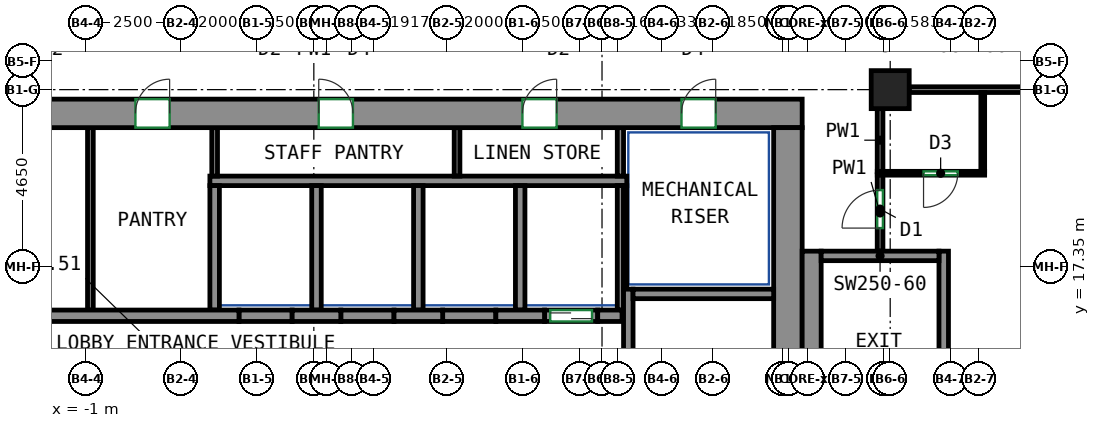
"""IFC4 building model, lengths in metres.
Left out: names, types, materials, properties, quantities, classifications, styles, units other than length and angle.
Written with IfcOpenShell. Run it as: python <this file> out.ifc"""

import sys

from ifc_helpers import new_model, si_unit, direction, frame, frame_2d, origin, origin_2d, place, context, subcontext, project, spatial, rectangle, extrude, source, transform, mapped, element, fill, save


model = new_model("IFC4")
c1 = context("Model", 3, precision=1e-05, world=origin(), true_north=direction((0.0, 1.0)))
c2 = subcontext(c1, "Body", "Model", "MODEL_VIEW")
j1 = project(units=[si_unit("LENGTHUNIT", "METRE"), si_unit("PLANEANGLEUNIT", "RADIAN")], contexts=[c1])
p1 = place(None, origin())
s1 = spatial("IfcSite", under=j1, at=p1, CompositionType="ELEMENT")
p2 = place(p1, origin())
s2 = spatial("IfcBuilding", under=s1, at=p2, CompositionType="ELEMENT")
p3 = place(p2, frame((0.0, 0.0, 206.7)))
s3 = spatial("IfcBuildingStorey", under=s2, at=p3, CompositionType="ELEMENT", Elevation=206.7)
m1 = source(origin(), c2, "Body", "SweptSolid", [
    extrude(rectangle(XDim=1.0, YDim=1.0, at=origin_2d()), origin(), (0.0, 0.0, 1.0), 3.12),
])
p4 = place(p3, frame((20.167, 22.0, 0.0), z_axis=(0.0, 0.0, 1.0), x_axis=(1.0, 0.0, 0.0)))
e1 = element("IfcColumn", 1, at=p4, inside=s3, PredefinedType="COLUMN", context=c2, shape_type="MappedRepresentation", body=[
    mapped(m1, transform((0.0, 0.0, 0.0))),
])
m2 = source(origin(), c2, "Body", "SweptSolid", [
    extrude(rectangle(XDim=33.6, YDim=0.75, at=frame_2d((16.8, 0.0))), origin(), (0.0, 0.0, 1.0), 3.12),
])
p5 = place(p3, frame((-15.75, 21.375, 0.0), z_axis=(0.0, 0.0, 1.0), x_axis=(1.0, 0.0, 0.0)))
e2 = element("IfcWall", 2, at=p5, inside=s3, PredefinedType="SHEAR", context=c2, shape_type="MappedRepresentation", body=[
    mapped(m2, transform((0.0, 0.0, 0.0))),
])
p6 = place(p5, frame((5.858, 0.0, 0.0)))
e3 = element("IfcOpeningElement", 3, at=p6, cuts=e2, PredefinedType="OPENING", context=c2, shape_type="SweptSolid", body=[
    extrude(rectangle(XDim=0.9, YDim=2.1, at=frame_2d((0.45, 1.05))), frame((0.0, 0.385, 0.0), z_axis=(0.0, -1.0, 0.0), x_axis=(1.0, 0.0, 0.0)), (0.0, 0.0, 1.0), 0.77),
])
p7 = place(p5, frame((10.923, 0.0, 0.0)))
e4 = element("IfcOpeningElement", 4, at=p7, cuts=e2, PredefinedType="OPENING", context=c2, shape_type="SweptSolid", body=[
    extrude(rectangle(XDim=0.9, YDim=2.1, at=frame_2d((0.45, 1.05))), frame((0.0, 0.385, 0.0), z_axis=(0.0, -1.0, 0.0), x_axis=(1.0, 0.0, 0.0)), (0.0, 0.0, 1.0), 0.77),
])
p8 = place(p5, frame((16.055, 0.0, 0.0)))
e5 = element("IfcOpeningElement", 5, at=p8, cuts=e2, PredefinedType="OPENING", context=c2, shape_type="SweptSolid", body=[
    extrude(rectangle(XDim=0.9, YDim=2.1, at=frame_2d((0.45, 1.05))), frame((0.0, 0.385, 0.0), z_axis=(0.0, -1.0, 0.0), x_axis=(1.0, 0.0, 0.0)), (0.0, 0.0, 1.0), 0.77),
])
p9 = place(p5, frame((20.879, 0.0, 0.0)))
e6 = element("IfcOpeningElement", 6, at=p9, cuts=e2, PredefinedType="OPENING", context=c2, shape_type="SweptSolid", body=[
    extrude(rectangle(XDim=0.9, YDim=2.1, at=frame_2d((0.45, 1.05))), frame((0.0, 0.385, 0.0), z_axis=(0.0, -1.0, 0.0), x_axis=(1.0, 0.0, 0.0)), (0.0, 0.0, 1.0), 0.77),
])
p10 = place(p5, frame((26.239, 0.0, 0.0)))
e7 = element("IfcOpeningElement", 7, at=p10, cuts=e2, PredefinedType="OPENING", context=c2, shape_type="SweptSolid", body=[
    extrude(rectangle(XDim=0.9, YDim=2.1, at=frame_2d((0.45, 1.05))), frame((0.0, 0.385, 0.0), z_axis=(0.0, -1.0, 0.0), x_axis=(1.0, 0.0, 0.0)), (0.0, 0.0, 1.0), 0.77),
])
p11 = place(p5, frame((2.275, 0.0, 0.0)))
e8 = element("IfcOpeningElement", 8, at=p11, cuts=e2, PredefinedType="OPENING", context=c2, shape_type="SweptSolid", body=[
    extrude(rectangle(XDim=0.9, YDim=2.1, at=frame_2d((0.45, 1.05))), frame((0.0, 0.385, 0.0), z_axis=(0.0, -1.0, 0.0), x_axis=(1.0, 0.0, 0.0)), (0.0, 0.0, 1.0), 0.77),
])
p12 = place(p5, frame((30.425, 0.0, 0.0)))
e9 = element("IfcOpeningElement", 9, at=p12, cuts=e2, PredefinedType="OPENING", context=c2, shape_type="SweptSolid", body=[
    extrude(rectangle(XDim=0.9, YDim=2.1, at=frame_2d((0.45, 1.05))), frame((0.0, 0.385, 0.0), z_axis=(0.0, -1.0, 0.0), x_axis=(1.0, 0.0, 0.0)), (0.0, 0.0, 1.0), 0.77),
])
m3 = source(origin(), c2, "Body", "SweptSolid", [
    extrude(rectangle(XDim=12.0, YDim=0.75, at=frame_2d((6.0, 0.0))), origin(), (0.0, 0.0, 1.0), 3.12),
])
p13 = place(p3, frame((17.475, 9.0, 0.0), z_axis=(0.0, 0.0, 1.0), x_axis=(0.0, 1.0, 0.0)))
e10 = element("IfcWall", 10, at=p13, inside=s3, PredefinedType="SHEAR", context=c2, shape_type="MappedRepresentation", body=[
    mapped(m3, transform((0.0, 0.0, 0.0))),
])
m4 = source(origin(), c2, "Body", "SweptSolid", [
    extrude(rectangle(XDim=7.75, YDim=0.25, at=frame_2d((3.875, 0.0))), origin(), (0.0, 0.0, 1.0), 3.12),
])
p14 = place(p3, frame((13.275, 9.0, 0.0), z_axis=(0.0, 0.0, 1.0), x_axis=(0.0, 1.0, 0.0)))
e11 = element("IfcWall", 11, at=p14, inside=s3, PredefinedType="SHEAR", context=c2, shape_type="MappedRepresentation", body=[
    mapped(m4, transform((0.0, 0.0, 0.0))),
])
m5 = source(origin(), c2, "Body", "SweptSolid", [
    extrude(rectangle(XDim=3.7, YDim=0.25, at=frame_2d((1.85, 0.0))), origin(), (0.0, 0.0, 1.0), 3.12),
])
p15 = place(p3, frame((13.4, 16.625, 0.0), z_axis=(0.0, 0.0, 1.0), x_axis=(1.0, 0.0, 0.0)))
e12 = element("IfcWall", 12, at=p15, inside=s3, PredefinedType="SHEAR", context=c2, shape_type="MappedRepresentation", body=[
    mapped(m5, transform((0.0, 0.0, 0.0))),
])
m6 = source(origin(), c2, "Body", "SweptSolid", [
    extrude(rectangle(XDim=8.0, YDim=0.5, at=frame_2d((4.0, 0.0))), origin(), (0.0, 0.0, 1.0), 3.12),
])
p16 = place(p3, frame((18.1, 9.75, 0.0), z_axis=(0.0, 0.0, 1.0), x_axis=(0.0, 1.0, 0.0)))
e13 = element("IfcWall", 13, at=p16, inside=s3, PredefinedType="SHEAR", context=c2, shape_type="MappedRepresentation", body=[
    mapped(m6, transform((0.0, 0.0, 0.0))),
])
m7 = source(origin(), c2, "Body", "SweptSolid", [
    extrude(rectangle(XDim=8.0, YDim=0.25, at=frame_2d((4.0, 0.0))), origin(), (0.0, 0.0, 1.0), 3.12),
])
p17 = place(p3, frame((21.575, 9.75, 0.0), z_axis=(0.0, 0.0, 1.0), x_axis=(0.0, 1.0, 0.0)))
e14 = element("IfcWall", 14, at=p17, inside=s3, PredefinedType="SHEAR", context=c2, shape_type="MappedRepresentation", body=[
    mapped(m7, transform((0.0, 0.0, 0.0))),
])
m8 = source(origin(), c2, "Body", "SweptSolid", [
    extrude(rectangle(XDim=3.1, YDim=0.25, at=frame_2d((1.55, 0.0))), origin(), (0.0, 0.0, 1.0), 3.12),
])
p18 = place(p3, frame((18.35, 17.625, 0.0), z_axis=(0.0, 0.0, 1.0), x_axis=(1.0, 0.0, 0.0)))
e15 = element("IfcWall", 15, at=p18, inside=s3, PredefinedType="SHEAR", context=c2, shape_type="MappedRepresentation", body=[
    mapped(m8, transform((0.0, 0.0, 0.0))),
])
m9 = source(origin(), c2, "Body", "SweptSolid", [
    extrude(rectangle(XDim=14.04, YDim=0.3, at=frame_2d((7.02, 0.0))), origin(), (0.0, 0.0, 1.0), 3.12),
])
p19 = place(p3, frame((-11.01, 16.05, 0.0), z_axis=(0.0, 0.0, 1.0), x_axis=(1.0, 0.0, 0.0)))
e16 = element("IfcWall", 16, at=p19, inside=s3, PredefinedType="SHEAR", context=c2, shape_type="MappedRepresentation", body=[
    mapped(m9, transform((0.0, 0.0, 0.0))),
])
m10 = source(origin(), c2, "Body", "SweptSolid", [
    extrude(rectangle(XDim=1.28, YDim=0.3, at=frame_2d((0.64, 0.0))), origin(), (0.0, 0.0, 1.0), 3.12),
])
p20 = place(p3, frame((4.43, 16.05, 0.0), z_axis=(0.0, 0.0, 1.0), x_axis=(1.0, 0.0, 0.0)))
e17 = element("IfcWall", 17, at=p20, inside=s3, PredefinedType="SHEAR", context=c2, shape_type="MappedRepresentation", body=[
    mapped(m10, transform((0.0, 0.0, 0.0))),
])
m11 = source(origin(), c2, "Body", "SweptSolid", [
    extrude(rectangle(XDim=1.28, YDim=0.3, at=frame_2d((0.64, 0.0))), origin(), (0.0, 0.0, 1.0), 3.12),
])
p21 = place(p3, frame((7.11, 16.05, 0.0), z_axis=(0.0, 0.0, 1.0), x_axis=(1.0, 0.0, 0.0)))
e18 = element("IfcWall", 18, at=p21, inside=s3, PredefinedType="SHEAR", context=c2, shape_type="MappedRepresentation", body=[
    mapped(m11, transform((0.0, 0.0, 0.0))),
])
p22 = place(p3, frame((9.79, 16.05, 0.0), z_axis=(0.0, 0.0, 1.0), x_axis=(1.0, 0.0, 0.0)))
e19 = element("IfcWall", 19, at=p22, inside=s3, PredefinedType="SHEAR", context=c2, shape_type="MappedRepresentation", body=[
    mapped(m10, transform((0.0, 0.0, 0.0))),
])
m12 = source(origin(), c2, "Body", "SweptSolid", [
    extrude(rectangle(XDim=0.64, YDim=0.3, at=frame_2d((0.32, 0.0))), origin(), (0.0, 0.0, 1.0), 3.12),
])
p23 = place(p3, frame((12.47, 16.05, 0.0), z_axis=(0.0, 0.0, 1.0), x_axis=(1.0, 0.0, 0.0)))
e20 = element("IfcWall", 20, at=p23, inside=s3, PredefinedType="SHEAR", context=c2, shape_type="MappedRepresentation", body=[
    mapped(m12, transform((0.0, 0.0, 0.0))),
])
m13 = source(origin(), c2, "Body", "SweptSolid", [
    extrude(rectangle(XDim=1.4, YDim=0.3, at=frame_2d((0.7, 0.0))), origin(), (0.0, 0.0, 1.0), 3.12),
])
p24 = place(p3, frame((11.07, 16.05, 0.0), z_axis=(0.0, 0.0, 1.0), x_axis=(1.0, 0.0, 0.0)))
e21 = element("IfcWall", 21, at=p24, inside=s3, PredefinedType="PARTITIONING", context=c2, shape_type="MappedRepresentation", body=[
    mapped(m13, transform((0.0, 0.0, 0.0))),
])
p25 = place(p24, frame((0.15, 0.0, 0.0)))
e22 = element("IfcOpeningElement", 22, at=p25, cuts=e21, PredefinedType="OPENING", context=c2, shape_type="SweptSolid", body=[
    extrude(rectangle(XDim=1.1, YDim=2.1, at=frame_2d((0.55, 1.05))), frame((0.0, 0.16, 0.0), z_axis=(0.0, -1.0, 0.0), x_axis=(1.0, 0.0, 0.0)), (0.0, 0.0, 1.0), 0.32),
])
p26 = place(p3, frame((3.03, 16.05, 0.0), z_axis=(0.0, 0.0, 1.0), x_axis=(1.0, 0.0, 0.0)))
e23 = element("IfcWall", 23, at=p26, inside=s3, PredefinedType="PARTITIONING", context=c2, shape_type="MappedRepresentation", body=[
    mapped(m13, transform((0.0, 0.0, 0.0))),
])
m14 = source(origin(), c2, "Body", "SweptSolid", [
    extrude(rectangle(XDim=1.4, YDim=0.3, at=frame_2d((0.7, 0.0))), origin(), (0.0, 0.0, 1.0), 3.12),
])
for number, where, z_axis, x_axis in (
    (24, (5.71, 16.05, 0.0), (0.0, 0.0, 1.0), (1.0, 0.0, 0.0)),
    (25, (8.39, 16.05, 0.0), (0.0, 0.0, 1.0), (1.0, 0.0, 0.0)),
):
    element("IfcWall", number, at=place(p3, frame(where, z_axis=z_axis, x_axis=x_axis)), inside=s3, PredefinedType="PARTITIONING", context=c2, shape_type="MappedRepresentation", body=[
        mapped(m14, transform((0.0, 0.0, 0.0))),
    ])
m15 = source(origin(), c2, "Body", "SweptSolid", [
    extrude(rectangle(XDim=10.97, YDim=0.25, at=frame_2d((5.485, 0.0))), origin(), (0.0, 0.0, 1.0), 3.12),
])
p27 = place(p3, frame((2.265, 19.6, 0.0), z_axis=(0.0, 0.0, 1.0), x_axis=(1.0, 0.0, 0.0)))
e26 = element("IfcWall", 26, at=p27, inside=s3, PredefinedType="PARTITIONING", context=c2, shape_type="MappedRepresentation", body=[
    mapped(m15, transform((0.0, 0.0, 0.0))),
])
m16 = source(origin(), c2, "Body", "SweptSolid", [
    extrude(rectangle(XDim=3.275, YDim=0.165, at=frame_2d((1.638, 0.0))), origin(), (0.0, 0.0, 1.0), 3.12),
])
p28 = place(p3, frame((13.067, 16.2, 0.0), z_axis=(0.0, 0.0, 1.0), x_axis=(0.0, 1.0, 0.0)))
e27 = element("IfcWall", 27, at=p28, inside=s3, PredefinedType="PARTITIONING", context=c2, shape_type="MappedRepresentation", body=[
    mapped(m16, transform((0.0, 0.0, 0.0))),
])
m17 = source(origin(), c2, "Body", "SweptSolid", [
    extrude(rectangle(XDim=1.275, YDim=0.165, at=frame_2d((0.637, 0.0))), origin(), (0.0, 0.0, 1.0), 3.12),
])
p29 = place(p3, frame((13.067, 19.725, 0.0), z_axis=(0.0, 0.0, 1.0), x_axis=(0.0, 1.0, 0.0)))
e28 = element("IfcWall", 28, at=p29, inside=s3, PredefinedType="PARTITIONING", context=c2, shape_type="MappedRepresentation", body=[
    mapped(m17, transform((0.0, 0.0, 0.0))),
])
m18 = source(origin(), c2, "Body", "SweptSolid", [
    extrude(rectangle(XDim=3.275, YDim=0.25, at=frame_2d((1.638, 0.0))), origin(), (0.0, 0.0, 1.0), 3.12),
])
p30 = place(p3, frame((10.43, 16.2, 0.0), z_axis=(0.0, 0.0, 1.0), x_axis=(0.0, 1.0, 0.0)))
e29 = element("IfcWall", 29, at=p30, inside=s3, PredefinedType="PARTITIONING", context=c2, shape_type="MappedRepresentation", body=[
    mapped(m18, transform((0.0, 0.0, 0.0))),
])
m19 = source(origin(), c2, "Body", "SweptSolid", [
    extrude(rectangle(XDim=2.725, YDim=0.085, at=frame_2d((1.363, 0.0))), origin(), (0.0, 0.0, 1.0), 3.12),
])
p31 = place(p3, frame((13.192, 16.75, 0.0), z_axis=(0.0, 0.0, 1.0), x_axis=(0.0, 1.0, 0.0)))
e30 = element("IfcWall", 30, at=p31, inside=s3, PredefinedType="PARTITIONING", context=c2, shape_type="MappedRepresentation", body=[
    mapped(m19, transform((0.0, 0.0, 0.0))),
])
for number, where, z_axis, x_axis in (
    (31, (2.39, 16.2, 0.0), (0.0, 0.0, 1.0), (0.0, 1.0, 0.0)),
    (32, (5.07, 16.2, 0.0), (0.0, 0.0, 1.0), (0.0, 1.0, 0.0)),
    (33, (7.75, 16.2, 0.0), (0.0, 0.0, 1.0), (0.0, 1.0, 0.0)),
):
    element("IfcWall", number, at=place(p3, frame(where, z_axis=z_axis, x_axis=x_axis)), inside=s3, PredefinedType="PARTITIONING", context=c2, shape_type="MappedRepresentation", body=[
        mapped(m18, transform((0.0, 0.0, 0.0))),
    ])
m20 = source(origin(), c2, "Body", "SweptSolid", [
    extrude(rectangle(XDim=4.8, YDim=0.15, at=frame_2d((2.4, 0.0))), origin(), (0.0, 0.0, 1.0), 3.12),
])
p32 = place(p3, frame((-0.88, 16.2, 0.0), z_axis=(0.0, 0.0, 1.0), x_axis=(0.0, 1.0, 0.0)))
e34 = element("IfcWall", 34, at=p32, inside=s3, PredefinedType="PARTITIONING", context=c2, shape_type="MappedRepresentation", body=[
    mapped(m20, transform((0.0, 0.0, 0.0))),
])
m21 = source(origin(), c2, "Body", "SweptSolid", [
    extrude(rectangle(XDim=1.275, YDim=0.15, at=frame_2d((0.637, 0.0))), origin(), (0.0, 0.0, 1.0), 3.12),
])
for number, where, z_axis, x_axis in (
    (35, (2.39, 19.725, 0.0), (0.0, 0.0, 1.0), (0.0, 1.0, 0.0)),
    (36, (8.768, 19.725, 0.0), (0.0, 0.0, 1.0), (0.0, 1.0, 0.0)),
):
    element("IfcWall", number, at=place(p3, frame(where, z_axis=z_axis, x_axis=x_axis)), inside=s3, PredefinedType="PARTITIONING", context=c2, shape_type="MappedRepresentation", body=[
        mapped(m21, transform((0.0, 0.0, 0.0))),
    ])
p33 = place(p3, frame((19.9, 17.75, 0.0), z_axis=(0.0, 0.0, 1.0), x_axis=(0.0, 1.0, 0.0)))
e37 = element("IfcWall", 37, at=p33, inside=s3, PredefinedType="PARTITIONING", context=c2, shape_type="SweptSolid", body=[
    extrude(rectangle(XDim=2.01, YDim=0.15, at=frame_2d((1.005, 0.0))), origin(), (0.0, 0.0, 1.0), 3.12),
])
p34 = place(p33, frame((0.607, 0.0, 0.0)))
e38 = element("IfcOpeningElement", 38, at=p34, cuts=e37, PredefinedType="OPENING", context=c2, shape_type="SweptSolid", body=[
    extrude(rectangle(XDim=1.0, YDim=2.1, at=frame_2d((0.5, 1.05))), frame((0.0, 0.085, 0.0), z_axis=(0.0, -1.0, 0.0), x_axis=(1.0, 0.0, 0.0)), (0.0, 0.0, 1.0), 0.17),
])
p35 = place(p3, frame((20.667, 22.0, 0.0), z_axis=(0.0, 0.0, 1.0), x_axis=(1.0, 0.0, 0.0)))
e39 = element("IfcWall", 39, at=p35, inside=s3, PredefinedType="PARTITIONING", context=c2, shape_type="SweptSolid", body=[
    extrude(rectangle(XDim=7.158, YDim=0.15, at=frame_2d((3.579, 0.0))), origin(), (0.0, 0.0, 1.0), 3.12),
])
p36 = place(p3, frame((19.9, 19.84, 0.0), z_axis=(0.0, 0.0, 1.0), x_axis=(0.0, 1.0, 0.0)))
e40 = element("IfcWall", 40, at=p36, inside=s3, PredefinedType="PARTITIONING", context=c2, shape_type="SweptSolid", body=[
    extrude(rectangle(XDim=1.66, YDim=0.15, at=frame_2d((0.83, 0.0))), origin(), (0.0, 0.0, 1.0), 3.12),
])
p37 = place(p3, frame((22.652, 19.8, 0.0), z_axis=(0.0, 0.0, 1.0), x_axis=(-1.0, 0.0, 0.0)))
e41 = element("IfcWall", 41, at=p37, inside=s3, PredefinedType="PARTITIONING", context=c2, shape_type="SweptSolid", body=[
    extrude(rectangle(XDim=2.825, YDim=0.1, at=frame_2d((1.413, 0.0))), origin(), (0.0, 0.0, 1.0), 3.12),
])
p38 = place(p37, frame((0.708, 0.0, 0.0)))
e42 = element("IfcOpeningElement", 42, at=p38, cuts=e41, PredefinedType="OPENING", context=c2, shape_type="SweptSolid", body=[
    extrude(rectangle(XDim=0.9, YDim=2.1, at=frame_2d((0.45, 1.05))), frame((0.0, 0.06, 0.0), z_axis=(0.0, -1.0, 0.0), x_axis=(1.0, 0.0, 0.0)), (0.0, 0.0, 1.0), 0.12),
])
p39 = place(p3, frame((22.602, 19.85, 0.0), z_axis=(0.0, 0.0, 1.0), x_axis=(0.0, 1.0, 0.0)))
e43 = element("IfcWall", 43, at=p39, inside=s3, PredefinedType="PARTITIONING", context=c2, shape_type="SweptSolid", body=[
    extrude(rectangle(XDim=2.073, YDim=0.1, at=frame_2d((1.037, 0.0))), origin(), (0.0, 0.0, 1.0), 3.12),
])
p40 = place(p25, origin())
e44 = element("IfcDoor", 44, at=p40, inside=s3, OperationType="DOUBLE_DOOR_SLIDING", PredefinedType="DOOR", context=c2, shape_type="SweptSolid", body=[
    extrude(rectangle(XDim=1.1, YDim=2.1, at=frame_2d((0.55, 1.05))), frame((0.0, 0.025, 0.0), z_axis=(0.0, -1.0, 0.0), x_axis=(1.0, 0.0, 0.0)), (0.0, 0.0, 1.0), 0.05),
])
fill(e22, e44)
p41 = place(p8, origin())
e45 = element("IfcDoor", 45, at=p41, inside=s3, OperationType="SINGLE_SWING_RIGHT", PredefinedType="DOOR", context=c2, shape_type="SweptSolid", body=[
    extrude(rectangle(XDim=0.9, YDim=2.1, at=frame_2d((0.45, 1.05))), frame((0.0, -0.23, 0.0), z_axis=(0.0, -1.0, 0.0), x_axis=(1.0, 0.0, 0.0)), (0.0, 0.0, 1.0), 0.05),
])
fill(e5, e45)
p42 = place(p9, origin())
e46 = element("IfcDoor", 46, at=p42, inside=s3, OperationType="SINGLE_SWING_LEFT", PredefinedType="DOOR", context=c2, shape_type="SweptSolid", body=[
    extrude(rectangle(XDim=0.9, YDim=2.1, at=frame_2d((0.45, 1.05))), frame((0.0, -0.23, 0.0), z_axis=(0.0, -1.0, 0.0), x_axis=(1.0, 0.0, 0.0)), (0.0, 0.0, 1.0), 0.05),
])
fill(e6, e46)
p43 = place(p10, origin())
e47 = element("IfcDoor", 47, at=p43, inside=s3, OperationType="SINGLE_SWING_RIGHT", PredefinedType="DOOR", context=c2, shape_type="SweptSolid", body=[
    extrude(rectangle(XDim=0.9, YDim=2.1, at=frame_2d((0.45, 1.05))), frame((0.0, -0.23, 0.0), z_axis=(0.0, -1.0, 0.0), x_axis=(1.0, 0.0, 0.0)), (0.0, 0.0, 1.0), 0.05),
])
fill(e7, e47)
p44 = place(p12, origin())
e48 = element("IfcDoor", 48, at=p44, inside=s3, OperationType="SINGLE_SWING_RIGHT", PredefinedType="DOOR", context=c2, shape_type="SweptSolid", body=[
    extrude(rectangle(XDim=0.9, YDim=2.1, at=frame_2d((0.45, 1.05))), frame((0.0, -0.23, 0.0), z_axis=(0.0, -1.0, 0.0), x_axis=(1.0, 0.0, 0.0)), (0.0, 0.0, 1.0), 0.05),
])
fill(e9, e48)
p45 = place(p34, origin())
e49 = element("IfcDoor", 49, at=p45, inside=s3, OperationType="SINGLE_SWING_LEFT", PredefinedType="DOOR", context=c2, shape_type="SweptSolid", body=[
    extrude(rectangle(XDim=1.0, YDim=2.1, at=frame_2d((0.5, 1.05))), frame((0.0, 0.025, 0.0), z_axis=(0.0, -1.0, 0.0), x_axis=(1.0, 0.0, 0.0)), (0.0, 0.0, 1.0), 0.05),
])
fill(e38, e49)
p46 = place(p38, origin())
e50 = element("IfcDoor", 50, at=p46, inside=s3, OperationType="SINGLE_SWING_RIGHT", PredefinedType="DOOR", context=c2, shape_type="SweptSolid", body=[
    extrude(rectangle(XDim=0.9, YDim=2.1, at=frame_2d((0.45, 1.05))), frame((0.0, 0.025, 0.0), z_axis=(0.0, -1.0, 0.0), x_axis=(1.0, 0.0, 0.0)), (0.0, 0.0, 1.0), 0.05),
])
fill(e42, e50)
save(model, sys.argv[1])
